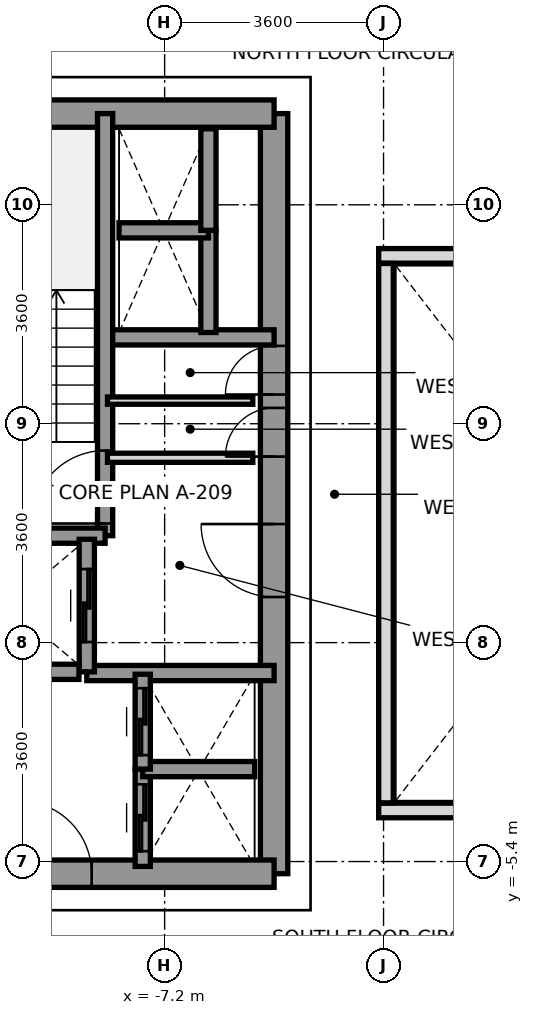
"""IFC4 building model, lengths in metres.
Left out: names, types, materials, properties, quantities, classifications, styles, units other than length and angle.
Written with IfcOpenShell. Run it as: python <this file> out.ifc"""

import sys

from ifc_helpers import new_model, si_unit, direction, frame, frame_2d, origin, place, context, subcontext, project, spatial, rectangle, extrude, source, transform, mapped, element, fill, save


model = new_model("IFC4")
c1 = context("Model", 3, precision=1e-05, world=origin(), true_north=direction((0.0, 1.0)))
c2 = subcontext(c1, "Body", "Model", "MODEL_VIEW")
j1 = project(units=[si_unit("LENGTHUNIT", "METRE"), si_unit("PLANEANGLEUNIT", "RADIAN")], contexts=[c1])
p1 = place(None, origin())
s1 = spatial("IfcSite", under=j1, at=p1, CompositionType="ELEMENT")
p2 = place(p1, origin())
s2 = spatial("IfcBuilding", under=s1, at=p2, CompositionType="ELEMENT")
p3 = place(p2, frame((0.0, 0.0, 117.6)))
s3 = spatial("IfcBuildingStorey", under=s2, at=p3, CompositionType="ELEMENT", Elevation=117.6)
p4 = place(p3, frame((-5.4, -5.6, 0.0), z_axis=(0.0, 0.0, 1.0), x_axis=(0.0, 1.0, 0.0)))
e1 = element("IfcWall", 1, at=p4, inside=s3, PredefinedType="SHEAR", context=c2, shape_type="SweptSolid", body=[
    extrude(rectangle(XDim=12.5, YDim=0.45, at=frame_2d((6.25, 0.0))), origin(), (0.0, 0.0, 1.0), 3.2),
])
p5 = place(p4, frame((4.55, 0.0, 0.0)))
e2 = element("IfcOpeningElement", 2, at=p5, cuts=e1, PredefinedType="OPENING", context=c2, shape_type="SweptSolid", body=[
    extrude(rectangle(XDim=1.2, YDim=2.2, at=frame_2d((0.6, 1.1))), frame((0.0, 0.235, 0.0), z_axis=(0.0, -1.0, 0.0), x_axis=(1.0, 0.0, 0.0)), (0.0, 0.0, 1.0), 0.47),
])
p6 = place(p4, frame((6.86, 0.0, 0.0)))
e3 = element("IfcOpeningElement", 3, at=p6, cuts=e1, PredefinedType="OPENING", context=c2, shape_type="SweptSolid", body=[
    extrude(rectangle(XDim=0.8, YDim=2.1, at=frame_2d((0.4, 1.05))), frame((0.0, 0.235, 0.0), z_axis=(0.0, -1.0, 0.0), x_axis=(1.0, 0.0, 0.0)), (0.0, 0.0, 1.0), 0.47),
])
p7 = place(p4, frame((7.88, 0.0, 0.0)))
e4 = element("IfcOpeningElement", 4, at=p7, cuts=e1, PredefinedType="OPENING", context=c2, shape_type="SweptSolid", body=[
    extrude(rectangle(XDim=0.8, YDim=2.1, at=frame_2d((0.4, 1.05))), frame((0.0, 0.235, 0.0), z_axis=(0.0, -1.0, 0.0), x_axis=(1.0, 0.0, 0.0)), (0.0, 0.0, 1.0), 0.47),
])
p8 = place(p3, frame((-11.381, 6.9, 0.0), z_axis=(0.0, 0.0, 1.0), x_axis=(1.0, 0.0, 0.0)))
e5 = element("IfcWall", 5, at=p8, inside=s3, PredefinedType="SHEAR", context=c2, shape_type="SweptSolid", body=[
    extrude(rectangle(XDim=5.981, YDim=0.45, at=frame_2d((2.991, 0.0))), origin(), (0.0, 0.0, 1.0), 3.2),
])
p9 = place(p3, frame((-13.2, -5.6, 0.0), z_axis=(0.0, 0.0, 1.0), x_axis=(1.0, 0.0, 0.0)))
e6 = element("IfcWall", 6, at=p9, inside=s3, PredefinedType="SHEAR", context=c2, shape_type="SweptSolid", body=[
    extrude(rectangle(XDim=7.8, YDim=0.45, at=frame_2d((3.9, 0.0))), origin(), (0.0, 0.0, 1.0), 3.2),
])
p10 = place(p9, frame((3.6, 0.0, 0.0)))
e7 = element("IfcOpeningElement", 7, at=p10, cuts=e6, PredefinedType="OPENING", context=c2, shape_type="SweptSolid", body=[
    extrude(rectangle(XDim=1.2, YDim=2.2, at=frame_2d((0.6, 1.1))), frame((0.0, 0.235, 0.0), z_axis=(0.0, -1.0, 0.0), x_axis=(1.0, 0.0, 0.0)), (0.0, 0.0, 1.0), 0.47),
])
p11 = place(p9, frame((0.65, 0.0, 0.0)))
e8 = element("IfcOpeningElement", 8, at=p11, cuts=e6, PredefinedType="OPENING", context=c2, shape_type="SweptSolid", body=[
    extrude(rectangle(XDim=0.8, YDim=2.1, at=frame_2d((0.4, 1.05))), frame((0.0, 0.235, 0.0), z_axis=(0.0, -1.0, 0.0), x_axis=(1.0, 0.0, 0.0)), (0.0, 0.0, 1.0), 0.47),
])
p12 = place(p3, frame((-8.18, 3.22, 0.0), z_axis=(0.0, 0.0, 1.0), x_axis=(1.0, 0.0, 0.0)))
e9 = element("IfcWall", 9, at=p12, inside=s3, PredefinedType="SOLIDWALL", context=c2, shape_type="SweptSolid", body=[
    extrude(rectangle(XDim=2.78, YDim=0.25, at=frame_2d((1.39, 0.0))), origin(), (0.0, 0.0, 1.0), 3.2),
])
p13 = place(p3, frame((-8.48, -2.3, 0.0), z_axis=(0.0, 0.0, 1.0), x_axis=(1.0, 0.0, 0.0)))
e10 = element("IfcWall", 10, at=p13, inside=s3, PredefinedType="SOLIDWALL", context=c2, shape_type="SweptSolid", body=[
    extrude(rectangle(XDim=3.08, YDim=0.25, at=frame_2d((1.54, 0.0))), origin(), (0.0, 0.0, 1.0), 3.2),
])
p14 = place(p3, frame((-8.179, -0.041, 0.0), z_axis=(0.0, 0.0, 1.0), x_axis=(0.0, 1.0, 0.0)))
e11 = element("IfcWall", 11, at=p14, inside=s3, PredefinedType="SOLIDWALL", context=c2, shape_type="SweptSolid", body=[
    extrude(rectangle(XDim=6.941, YDim=0.25, at=frame_2d((3.47, 0.0))), origin(), (0.0, 0.0, 1.0), 3.2),
])
p15 = place(p14, frame((0.2, 0.0, 0.0)))
e12 = element("IfcOpeningElement", 12, at=p15, cuts=e11, PredefinedType="OPENING", context=c2, shape_type="SweptSolid", body=[
    extrude(rectangle(XDim=1.2, YDim=2.2, at=frame_2d((0.6, 1.1))), frame((0.0, 0.135, 0.0), z_axis=(0.0, -1.0, 0.0), x_axis=(1.0, 0.0, 0.0)), (0.0, 0.0, 1.0), 0.27),
])
p16 = place(p3, frame((-11.381, -0.041, 0.0), z_axis=(0.0, 0.0, 1.0), x_axis=(1.0, 0.0, 0.0)))
e13 = element("IfcWall", 13, at=p16, inside=s3, PredefinedType="SOLIDWALL", context=c2, shape_type="SweptSolid", body=[
    extrude(rectangle(XDim=3.202, YDim=0.25, at=frame_2d((1.601, 0.0))), origin(), (0.0, 0.0, 1.0), 3.2),
])
p17 = place(p3, frame((-8.48, -2.28, 0.0), z_axis=(0.0, 0.0, 1.0), x_axis=(0.0, 1.0, 0.0)))
e14 = element("IfcWall", 14, at=p17, inside=s3, PredefinedType="SOLIDWALL", context=c2, shape_type="SweptSolid", body=[
    extrude(rectangle(XDim=2.18, YDim=0.25, at=frame_2d((1.09, 0.0))), origin(), (0.0, 0.0, 1.0), 3.2),
])
p18 = place(p17, frame((0.49, 0.0, 0.0)))
e15 = element("IfcOpeningElement", 15, at=p18, cuts=e14, PredefinedType="OPENING", context=c2, shape_type="SweptSolid", body=[
    extrude(rectangle(XDim=1.2, YDim=2.2, at=frame_2d((0.6, 1.1))), frame((0.0, 0.135, 0.0), z_axis=(0.0, -1.0, 0.0), x_axis=(1.0, 0.0, 0.0)), (0.0, 0.0, 1.0), 0.27),
])
p19 = place(p3, frame((-10.921, -2.28, 0.0), z_axis=(0.0, 0.0, 1.0), x_axis=(1.0, 0.0, 0.0)))
e16 = element("IfcWall", 16, at=p19, inside=s3, PredefinedType="SOLIDWALL", context=c2, shape_type="SweptSolid", body=[
    extrude(rectangle(XDim=2.312, YDim=0.25, at=frame_2d((1.156, 0.0))), origin(), (0.0, 0.0, 1.0), 3.2),
])
p20 = place(p3, frame((-7.56, -5.48, 0.0), z_axis=(0.0, 0.0, 1.0), x_axis=(0.0, 1.0, 0.0)))
e17 = element("IfcWall", 17, at=p20, inside=s3, PredefinedType="SOLIDWALL", context=c2, shape_type="SweptSolid", body=[
    extrude(rectangle(XDim=1.6, YDim=0.25, at=frame_2d((0.8, 0.0))), origin(), (0.0, 0.0, 1.0), 3.2),
])
p21 = place(p20, frame((0.25, 0.0, 0.0)))
e18 = element("IfcOpeningElement", 18, at=p21, cuts=e17, PredefinedType="OPENING", context=c2, shape_type="SweptSolid", body=[
    extrude(rectangle(XDim=1.1, YDim=2.2, at=frame_2d((0.55, 1.1))), frame((0.0, 0.135, 0.0), z_axis=(0.0, -1.0, 0.0), x_axis=(1.0, 0.0, 0.0)), (0.0, 0.0, 1.0), 0.27),
])
p22 = place(p3, frame((-7.56, -3.88, 0.0), z_axis=(0.0, 0.0, 1.0), x_axis=(1.0, 0.0, 0.0)))
e19 = element("IfcWall", 19, at=p22, inside=s3, PredefinedType="SOLIDWALL", context=c2, shape_type="SweptSolid", body=[
    extrude(rectangle(XDim=1.84, YDim=0.25, at=frame_2d((0.92, 0.0))), origin(), (0.0, 0.0, 1.0), 3.2),
])
p23 = place(p3, frame((-7.56, -3.88, 0.0), z_axis=(0.0, 0.0, 1.0), x_axis=(0.0, 1.0, 0.0)))
e20 = element("IfcWall", 20, at=p23, inside=s3, PredefinedType="SOLIDWALL", context=c2, shape_type="SweptSolid", body=[
    extrude(rectangle(XDim=1.56, YDim=0.25, at=frame_2d((0.78, 0.0))), origin(), (0.0, 0.0, 1.0), 3.2),
])
p24 = place(p23, frame((0.23, 0.0, 0.0)))
e21 = element("IfcOpeningElement", 21, at=p24, cuts=e20, PredefinedType="OPENING", context=c2, shape_type="SweptSolid", body=[
    extrude(rectangle(XDim=1.1, YDim=2.2, at=frame_2d((0.55, 1.1))), frame((0.0, 0.135, 0.0), z_axis=(0.0, -1.0, 0.0), x_axis=(1.0, 0.0, 0.0)), (0.0, 0.0, 1.0), 0.27),
])
p25 = place(p3, frame((-6.48, 3.3, 0.0), z_axis=(0.0, 0.0, 1.0), x_axis=(0.0, 1.0, 0.0)))
e22 = element("IfcWall", 22, at=p25, inside=s3, PredefinedType="SOLIDWALL", context=c2, shape_type="SweptSolid", body=[
    extrude(rectangle(XDim=1.68, YDim=0.25, at=frame_2d((0.84, 0.0))), origin(), (0.0, 0.0, 1.0), 3.2),
])
p26 = place(p3, frame((-7.95, 4.98, 0.0), z_axis=(0.0, 0.0, 1.0), x_axis=(1.0, 0.0, 0.0)))
e23 = element("IfcWall", 23, at=p26, inside=s3, PredefinedType="SOLIDWALL", context=c2, shape_type="SweptSolid", body=[
    extrude(rectangle(XDim=1.47, YDim=0.25, at=frame_2d((0.735, 0.0))), origin(), (0.0, 0.0, 1.0), 3.2),
])
p27 = place(p3, frame((-6.48, 4.98, 0.0), z_axis=(0.0, 0.0, 1.0), x_axis=(0.0, 1.0, 0.0)))
e24 = element("IfcWall", 24, at=p27, inside=s3, PredefinedType="SOLIDWALL", context=c2, shape_type="SweptSolid", body=[
    extrude(rectangle(XDim=1.67, YDim=0.25, at=frame_2d((0.835, 0.0))), origin(), (0.0, 0.0, 1.0), 3.2),
])
p28 = place(p3, frame((-8.14, 1.24, 0.0), z_axis=(0.0, 0.0, 1.0), x_axis=(1.0, 0.0, 0.0)))
e25 = element("IfcWall", 25, at=p28, inside=s3, PredefinedType="PARTITIONING", context=c2, shape_type="SweptSolid", body=[
    extrude(rectangle(XDim=2.39, YDim=0.15, at=frame_2d((1.195, 0.0))), origin(), (0.0, 0.0, 1.0), 2.3),
])
p29 = place(p3, frame((-8.14, 2.18, 0.0), z_axis=(0.0, 0.0, 1.0), x_axis=(1.0, 0.0, 0.0)))
e26 = element("IfcWall", 26, at=p29, inside=s3, PredefinedType="PARTITIONING", context=c2, shape_type="SweptSolid", body=[
    extrude(rectangle(XDim=2.39, YDim=0.12, at=frame_2d((1.195, 0.0))), origin(), (0.0, 0.0, 1.0), 2.3),
])
for number, where, z_axis, x_axis in (
    (27, (-3.68, -4.56, 0.0), (0.0, 0.0, 1.0), (1.0, 0.0, 0.0)),
    (28, (-3.68, 4.56, 0.0), (0.0, 0.0, 1.0), (1.0, 0.0, 0.0)),
):
    element("IfcWall", number, at=place(p3, frame(where, z_axis=z_axis, x_axis=x_axis)), inside=s3, PredefinedType="PARAPET", context=c2, shape_type="SweptSolid", body=[
        extrude(rectangle(XDim=7.36, YDim=0.24, at=frame_2d((3.68, 0.0))), origin(), (0.0, 0.0, 1.0), 1.15),
    ])
p30 = place(p3, frame((-3.56, -4.435, 0.0), z_axis=(0.0, 0.0, 1.0), x_axis=(0.0, 1.0, 0.0)))
e29 = element("IfcWall", 29, at=p30, inside=s3, PredefinedType="PARAPET", context=c2, shape_type="SweptSolid", body=[
    extrude(rectangle(XDim=8.87, YDim=0.24, at=frame_2d((4.435, 0.0))), origin(), (0.0, 0.0, 1.0), 1.15),
])
m1 = source(origin(), c2, "Body", "SweptSolid", [
    extrude(rectangle(XDim=1.2, YDim=2.2, at=frame_2d((0.6, 1.1))), frame((0.0, 0.025, 0.0), z_axis=(0.0, -1.0, 0.0), x_axis=(1.0, 0.0, 0.0)), (0.0, 0.0, 1.0), 0.05),
])
p31 = place(p15, origin())
e30 = element("IfcDoor", 30, at=p31, inside=s3, OperationType="SINGLE_SWING_LEFT", PredefinedType="DOOR", context=c2, shape_type="MappedRepresentation", body=[
    mapped(m1, transform((0.0, 0.0, 0.0), x_axis=(1.0, 0.0, 0.0), y_axis=(0.0, 1.0, 0.0), z_axis=(0.0, 0.0, 1.0), scale=1.0)),
])
fill(e12, e30)
p32 = place(p5, origin())
e31 = element("IfcDoor", 31, at=p32, inside=s3, OperationType="SINGLE_SWING_RIGHT", PredefinedType="DOOR", context=c2, shape_type="MappedRepresentation", body=[
    mapped(m1, transform((0.0, 0.0, 0.0), x_axis=(1.0, 0.0, 0.0), y_axis=(0.0, 1.0, 0.0), z_axis=(0.0, 0.0, 1.0), scale=1.0)),
])
fill(e2, e31)
p33 = place(p10, origin())
e32 = element("IfcDoor", 32, at=p33, inside=s3, OperationType="SINGLE_SWING_LEFT", PredefinedType="DOOR", context=c2, shape_type="MappedRepresentation", body=[
    mapped(m1, transform((0.0, 0.0, 0.0), x_axis=(1.0, 0.0, 0.0), y_axis=(0.0, 1.0, 0.0), z_axis=(0.0, 0.0, 1.0), scale=1.0)),
])
fill(e7, e32)
m2 = source(origin(), c2, "Body", "SweptSolid", [
    extrude(rectangle(XDim=0.8, YDim=2.1, at=frame_2d((0.4, 1.05))), frame((0.0, 0.025, 0.0), z_axis=(0.0, -1.0, 0.0), x_axis=(1.0, 0.0, 0.0)), (0.0, 0.0, 1.0), 0.05),
])
p34 = place(p6, origin())
e33 = element("IfcDoor", 33, at=p34, inside=s3, OperationType="SINGLE_SWING_LEFT", PredefinedType="DOOR", context=c2, shape_type="MappedRepresentation", body=[
    mapped(m2, transform((0.0, 0.0, 0.0), x_axis=(1.0, 0.0, 0.0), y_axis=(0.0, 1.0, 0.0), z_axis=(0.0, 0.0, 1.0), scale=1.0)),
])
fill(e3, e33)
p35 = place(p7, origin())
e34 = element("IfcDoor", 34, at=p35, inside=s3, OperationType="SINGLE_SWING_LEFT", PredefinedType="DOOR", context=c2, shape_type="MappedRepresentation", body=[
    mapped(m2, transform((0.0, 0.0, 0.0), x_axis=(1.0, 0.0, 0.0), y_axis=(0.0, 1.0, 0.0), z_axis=(0.0, 0.0, 1.0), scale=1.0)),
])
fill(e4, e34)
p36 = place(p18, origin())
e35 = element("IfcDoor", 35, at=p36, inside=s3, OperationType="SLIDING_TO_RIGHT", PredefinedType="DOOR", context=c2, shape_type="MappedRepresentation", body=[
    mapped(m1, transform((0.0, 0.0, 0.0), x_axis=(1.0, 0.0, 0.0), y_axis=(0.0, 1.0, 0.0), z_axis=(0.0, 0.0, 1.0), scale=1.0)),
])
fill(e15, e35)
m3 = source(origin(), c2, "Body", "SweptSolid", [
    extrude(rectangle(XDim=1.1, YDim=2.2, at=frame_2d((0.55, 1.1))), frame((0.0, 0.025, 0.0), z_axis=(0.0, -1.0, 0.0), x_axis=(1.0, 0.0, 0.0)), (0.0, 0.0, 1.0), 0.05),
])
p37 = place(p21, origin())
e36 = element("IfcDoor", 36, at=p37, inside=s3, OperationType="SLIDING_TO_LEFT", PredefinedType="DOOR", context=c2, shape_type="MappedRepresentation", body=[
    mapped(m3, transform((0.0, 0.0, 0.0), x_axis=(1.0, 0.0, 0.0), y_axis=(0.0, 1.0, 0.0), z_axis=(0.0, 0.0, 1.0), scale=1.0)),
])
fill(e18, e36)
p38 = place(p24, origin())
e37 = element("IfcDoor", 37, at=p38, inside=s3, OperationType="SLIDING_TO_LEFT", PredefinedType="DOOR", context=c2, shape_type="MappedRepresentation", body=[
    mapped(m3, transform((0.0, 0.0, 0.0), x_axis=(1.0, 0.0, 0.0), y_axis=(0.0, 1.0, 0.0), z_axis=(0.0, 0.0, 1.0), scale=1.0)),
])
fill(e21, e37)
save(model, sys.argv[1])
